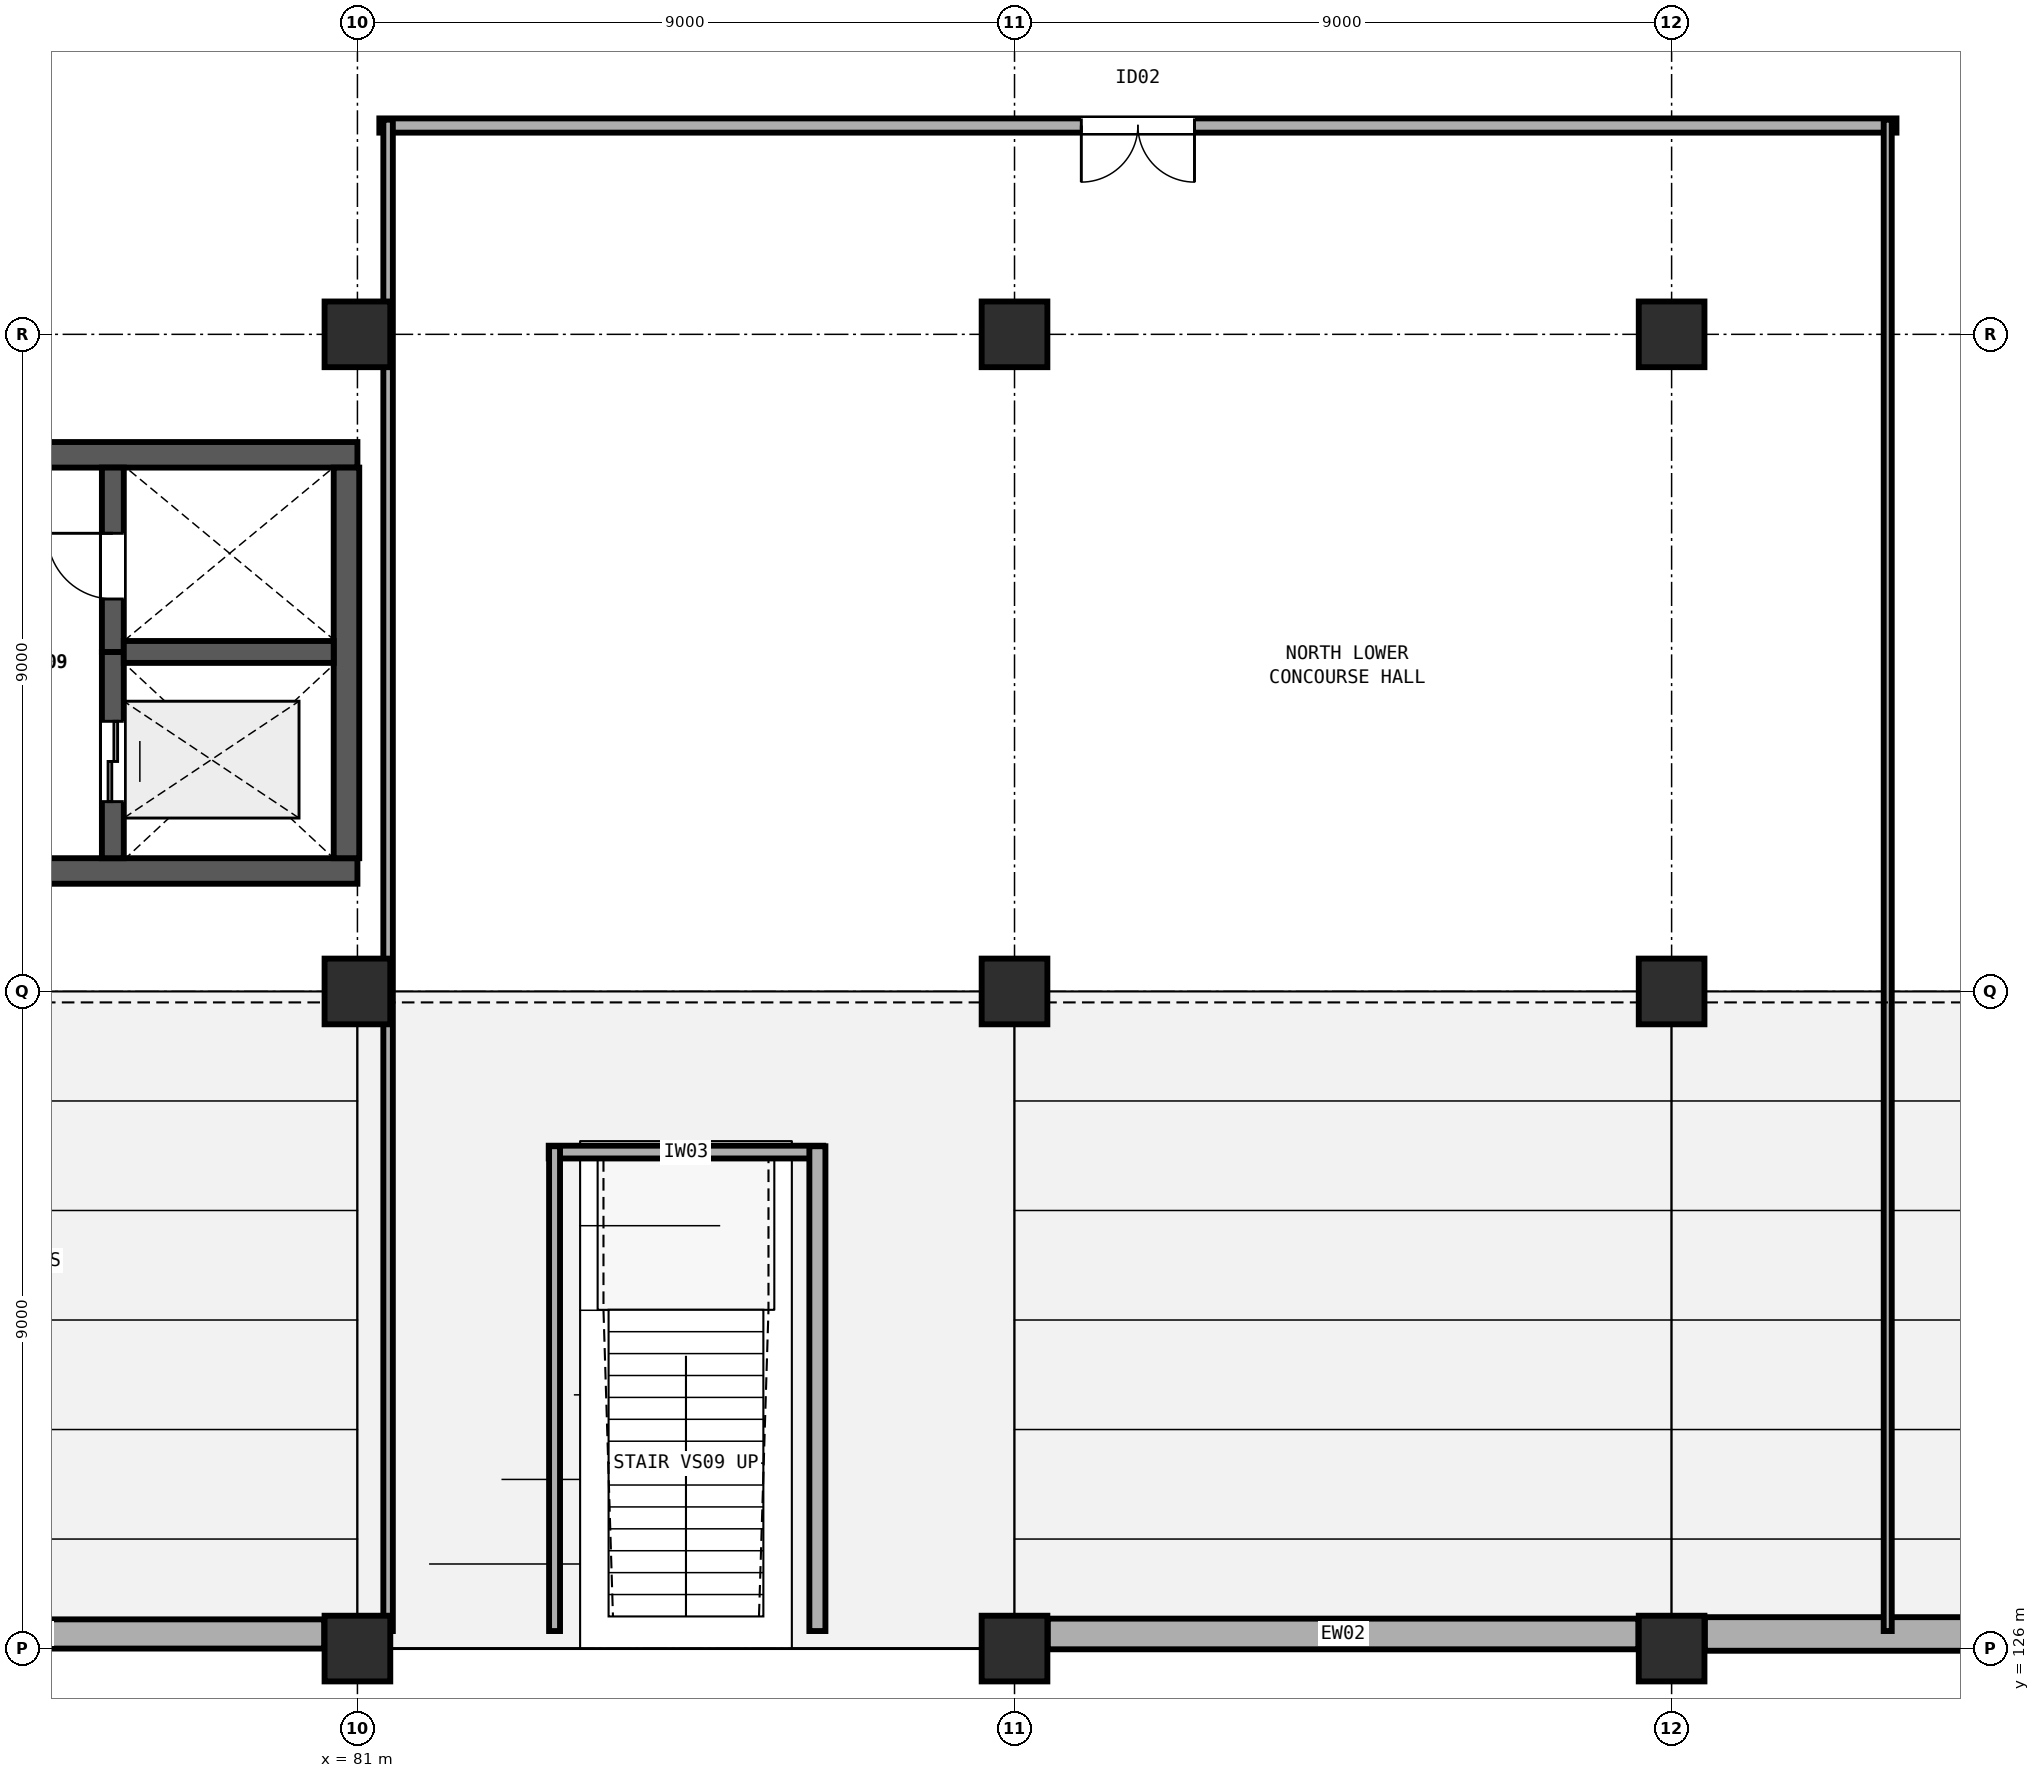
"""IFC4 building model, lengths in metres.
Left out: names, types, materials, properties, quantities, classifications, styles, units other than length and angle.
Written with IfcOpenShell. Run it as: python <this file> out.ifc"""

import sys

from ifc_helpers import new_model, si_unit, direction, frame, frame_2d, origin, origin_2d, place, context, subcontext, project, spatial, rectangle, extrude, element, fill, save


model = new_model("IFC4")
c1 = context("Model", 3, precision=1e-05, world=origin(), true_north=direction((0.0, 1.0)))
c2 = subcontext(c1, "Body", "Model", "MODEL_VIEW")
j1 = project(units=[si_unit("LENGTHUNIT", "METRE"), si_unit("PLANEANGLEUNIT", "RADIAN")], contexts=[c1])
p1 = place(None, origin())
s1 = spatial("IfcSite", under=j1, at=p1, CompositionType="ELEMENT")
p2 = place(p1, origin())
s2 = spatial("IfcBuilding", under=s1, at=p2, CompositionType="ELEMENT")
p3 = place(p2, frame((0.0, 0.0, 4.8)))
s3 = spatial("IfcBuildingStorey", under=s2, at=p3, CompositionType="ELEMENT", Elevation=4.8)
for number, where, z_axis, x_axis in (
    (1, (81.0, 126.0, 0.0), (0.0, 0.0, 1.0), (1.0, 0.0, 0.0)),
    (2, (81.0, 135.0, 0.0), (0.0, 0.0, 1.0), (1.0, 0.0, 0.0)),
    (3, (81.0, 144.0, 0.0), (0.0, 0.0, 1.0), (1.0, 0.0, 0.0)),
    (4, (90.0, 126.0, 0.0), (0.0, 0.0, 1.0), (1.0, 0.0, 0.0)),
    (5, (90.0, 135.0, 0.0), (0.0, 0.0, 1.0), (1.0, 0.0, 0.0)),
    (6, (90.0, 144.0, 0.0), (0.0, 0.0, 1.0), (1.0, 0.0, 0.0)),
    (7, (99.0, 126.0, 0.0), (0.0, 0.0, 1.0), (1.0, 0.0, 0.0)),
    (8, (99.0, 135.0, 0.0), (0.0, 0.0, 1.0), (1.0, 0.0, 0.0)),
    (9, (99.0, 144.0, 0.0), (0.0, 0.0, 1.0), (1.0, 0.0, 0.0)),
):
    element("IfcColumn", number, at=place(p3, frame(where, z_axis=z_axis, x_axis=x_axis)), inside=s3, PredefinedType="COLUMN", context=c2, shape_type="SweptSolid", body=[
        extrude(rectangle(XDim=0.9, YDim=0.9, at=origin_2d()), origin(), (0.0, 0.0, 1.0), 4.8),
    ])
p4 = place(p3, frame((63.0, 136.65, 0.0), z_axis=(0.0, 0.0, 1.0), x_axis=(1.0, 0.0, 0.0)))
e10 = element("IfcWall", 10, at=p4, inside=s3, PredefinedType="SHEAR", context=c2, shape_type="SweptSolid", body=[
    extrude(rectangle(XDim=18.0, YDim=0.35, at=frame_2d((9.0, 0.0))), origin(), (0.0, 0.0, 1.0), 4.52),
])
p5 = place(p3, frame((81.0, 142.35, 0.0), z_axis=(0.0, 0.0, 1.0), x_axis=(-1.0, 0.0, 0.0)))
e11 = element("IfcWall", 11, at=p5, inside=s3, PredefinedType="SHEAR", context=c2, shape_type="SweptSolid", body=[
    extrude(rectangle(XDim=18.0, YDim=0.35, at=frame_2d((9.0, 0.0))), origin(), (0.0, 0.0, 1.0), 4.52),
])
p6 = place(p5, frame((4.7, 0.0, 0.0)))
e12 = element("IfcOpeningElement", 12, at=p6, cuts=e11, PredefinedType="OPENING", context=c2, shape_type="SweptSolid", body=[
    extrude(rectangle(XDim=1.9, YDim=2.25, at=frame_2d((0.95, 1.125))), frame((0.0, 0.185, 0.0), z_axis=(0.0, -1.0, 0.0), x_axis=(1.0, 0.0, 0.0)), (0.0, 0.0, 1.0), 0.37),
])
p7 = place(p3, frame((80.85, 136.825, 0.0), z_axis=(0.0, 0.0, 1.0), x_axis=(0.0, 1.0, 0.0)))
e13 = element("IfcWall", 13, at=p7, inside=s3, PredefinedType="SHEAR", context=c2, shape_type="SweptSolid", body=[
    extrude(rectangle(XDim=5.35, YDim=0.35, at=frame_2d((2.675, 0.0))), origin(), (0.0, 0.0, 1.0), 4.52),
])
p8 = place(p3, frame((77.65, 136.825, 0.0), z_axis=(0.0, 0.0, 1.0), x_axis=(0.0, 1.0, 0.0)))
e14 = element("IfcWall", 14, at=p8, inside=s3, PredefinedType="SHEAR", context=c2, shape_type="SweptSolid", body=[
    extrude(rectangle(XDim=2.825, YDim=0.3, at=frame_2d((1.413, 0.0))), origin(), (0.0, 0.0, 1.0), 4.52),
])
p9 = place(p8, frame((0.775, 0.0, 0.0)))
e15 = element("IfcOpeningElement", 15, at=p9, cuts=e14, PredefinedType="OPENING", context=c2, shape_type="SweptSolid", body=[
    extrude(rectangle(XDim=1.1, YDim=2.1, at=frame_2d((0.55, 1.05))), frame((0.0, 0.16, 0.0), z_axis=(0.0, -1.0, 0.0), x_axis=(1.0, 0.0, 0.0)), (0.0, 0.0, 1.0), 0.32),
])
p10 = place(p3, frame((77.65, 139.65, 0.0), z_axis=(0.0, 0.0, 1.0), x_axis=(0.0, 1.0, 0.0)))
e16 = element("IfcWall", 16, at=p10, inside=s3, PredefinedType="SHEAR", context=c2, shape_type="SweptSolid", body=[
    extrude(rectangle(XDim=2.525, YDim=0.3, at=frame_2d((1.263, 0.0))), origin(), (0.0, 0.0, 1.0), 4.52),
])
p11 = place(p10, frame((0.725, 0.0, 0.0)))
e17 = element("IfcOpeningElement", 17, at=p11, cuts=e16, PredefinedType="OPENING", context=c2, shape_type="SweptSolid", body=[
    extrude(rectangle(XDim=0.9, YDim=2.1, at=frame_2d((0.45, 1.05))), frame((0.0, 0.16, 0.0), z_axis=(0.0, -1.0, 0.0), x_axis=(1.0, 0.0, 0.0)), (0.0, 0.0, 1.0), 0.32),
])
p12 = place(p3, frame((77.8, 139.65, 0.0), z_axis=(0.0, 0.0, 1.0), x_axis=(1.0, 0.0, 0.0)))
e18 = element("IfcWall", 18, at=p12, inside=s3, PredefinedType="SHEAR", context=c2, shape_type="SweptSolid", body=[
    extrude(rectangle(XDim=2.875, YDim=0.3, at=frame_2d((1.438, 0.0))), origin(), (0.0, 0.0, 1.0), 4.52),
])
p13 = place(p3, frame((107.545, 126.2, 0.0), z_axis=(0.0, 0.0, 1.0), x_axis=(-1.0, 0.0, 0.0)))
e19 = element("IfcWall", 19, at=p13, inside=s3, PredefinedType="SOLIDWALL", context=c2, shape_type="SweptSolid", body=[
    extrude(rectangle(XDim=8.09, YDim=0.46, at=frame_2d((4.045, 0.0))), origin(), (0.0, 0.0, 1.0), 3.28),
])
p14 = place(p3, frame((98.545, 126.2, 0.0), z_axis=(0.0, 0.0, 1.0), x_axis=(-1.0, 0.0, 0.0)))
e20 = element("IfcWall", 20, at=p14, inside=s3, PredefinedType="SOLIDWALL", context=c2, shape_type="SweptSolid", body=[
    extrude(rectangle(XDim=8.09, YDim=0.42, at=frame_2d((4.045, 0.0))), origin(), (0.0, 0.0, 1.0), 3.28),
])
p15 = place(p3, frame((80.545, 126.2, 0.0), z_axis=(0.0, 0.0, 1.0), x_axis=(-1.0, 0.0, 0.0)))
e21 = element("IfcWall", 21, at=p15, inside=s3, PredefinedType="SOLIDWALL", context=c2, shape_type="SweptSolid", body=[
    extrude(rectangle(XDim=8.09, YDim=0.4, at=frame_2d((4.045, 0.0))), origin(), (0.0, 0.0, 1.0), 3.28),
])
p16 = place(p3, frame((102.08, 146.86, 0.0), z_axis=(0.0, 0.0, 1.0), x_axis=(-1.0, 0.0, 0.0)))
e22 = element("IfcWall", 22, at=p16, inside=s3, PredefinedType="PARTITIONING", context=c2, shape_type="SweptSolid", body=[
    extrude(rectangle(XDim=20.78, YDim=0.195, at=frame_2d((10.39, 0.0))), origin(), (0.0, 0.0, 1.0), 3.28),
])
p17 = place(p16, frame((9.615, 0.0, 0.0)))
e23 = element("IfcOpeningElement", 23, at=p17, cuts=e22, PredefinedType="OPENING", context=c2, shape_type="SweptSolid", body=[
    extrude(rectangle(XDim=1.55, YDim=2.2, at=frame_2d((0.775, 1.1))), frame((0.0, 0.107, 0.0), z_axis=(0.0, -1.0, 0.0), x_axis=(1.0, 0.0, 0.0)), (0.0, 0.0, 1.0), 0.215),
])
p18 = place(p3, frame((87.38, 132.8, 0.0), z_axis=(0.0, 0.0, 1.0), x_axis=(-1.0, 0.0, 0.0)))
e24 = element("IfcWall", 24, at=p18, inside=s3, PredefinedType="PARTITIONING", context=c2, shape_type="SweptSolid", body=[
    extrude(rectangle(XDim=3.76, YDim=0.175, at=frame_2d((1.88, 0.0))), origin(), (0.0, 0.0, 1.0), 3.28),
])
p19 = place(p3, frame((83.7, 132.88, 0.0), z_axis=(0.0, 0.0, 1.0), x_axis=(0.0, -1.0, 0.0)))
e25 = element("IfcWall", 25, at=p19, inside=s3, PredefinedType="PARTITIONING", context=c2, shape_type="SweptSolid", body=[
    extrude(rectangle(XDim=6.64, YDim=0.15, at=frame_2d((3.32, 0.0))), origin(), (0.0, 0.0, 1.0), 3.28),
])
p20 = place(p3, frame((81.42, 126.24, 0.0), z_axis=(0.0, 0.0, 1.0), x_axis=(0.0, 1.0, 0.0)))
e26 = element("IfcWall", 26, at=p20, inside=s3, PredefinedType="PARTITIONING", context=c2, shape_type="SweptSolid", body=[
    extrude(rectangle(XDim=20.7, YDim=0.13, at=frame_2d((10.35, 0.0))), origin(), (0.0, 0.0, 1.0), 3.28),
])
p21 = place(p3, frame((101.96, 146.94, 0.0), z_axis=(0.0, 0.0, 1.0), x_axis=(0.0, -1.0, 0.0)))
e27 = element("IfcWall", 27, at=p21, inside=s3, PredefinedType="PARTITIONING", context=c2, shape_type="SweptSolid", body=[
    extrude(rectangle(XDim=20.7, YDim=0.11, at=frame_2d((10.35, 0.0))), origin(), (0.0, 0.0, 1.0), 3.28),
])
p22 = place(p3, frame((87.3, 126.24, 0.0), z_axis=(0.0, 0.0, 1.0), x_axis=(0.0, 1.0, 0.0)))
e28 = element("IfcWall", 28, at=p22, inside=s3, PredefinedType="PARTITIONING", context=c2, shape_type="SweptSolid", body=[
    extrude(rectangle(XDim=6.64, YDim=0.22, at=frame_2d((3.32, 0.0))), origin(), (0.0, 0.0, 1.0), 3.28),
])
p23 = place(p11, origin())
e29 = element("IfcDoor", 29, at=p23, inside=s3, OperationType="SINGLE_SWING_RIGHT", PredefinedType="DOOR", context=c2, shape_type="SweptSolid", body=[
    extrude(rectangle(XDim=0.9, YDim=2.1, at=frame_2d((0.45, 1.05))), frame((0.0, 0.025, 0.0), z_axis=(0.0, -1.0, 0.0), x_axis=(1.0, 0.0, 0.0)), (0.0, 0.0, 1.0), 0.05),
])
fill(e17, e29)
p24 = place(p9, origin())
e30 = element("IfcDoor", 30, at=p24, inside=s3, OperationType="DOUBLE_DOOR_SLIDING", PredefinedType="DOOR", context=c2, shape_type="SweptSolid", body=[
    extrude(rectangle(XDim=1.1, YDim=2.1, at=frame_2d((0.55, 1.05))), frame((0.0, 0.025, 0.0), z_axis=(0.0, -1.0, 0.0), x_axis=(1.0, 0.0, 0.0)), (0.0, 0.0, 1.0), 0.05),
])
fill(e15, e30)
p25 = place(p17, origin())
e31 = element("IfcDoor", 31, at=p25, inside=s3, OperationType="DOUBLE_DOOR_SINGLE_SWING", PredefinedType="DOOR", context=c2, shape_type="SweptSolid", body=[
    extrude(rectangle(XDim=1.55, YDim=2.2, at=frame_2d((0.775, 1.1))), frame((0.0, 0.025, 0.0), z_axis=(0.0, -1.0, 0.0), x_axis=(1.0, 0.0, 0.0)), (0.0, 0.0, 1.0), 0.05),
])
fill(e23, e31)
save(model, sys.argv[1])
